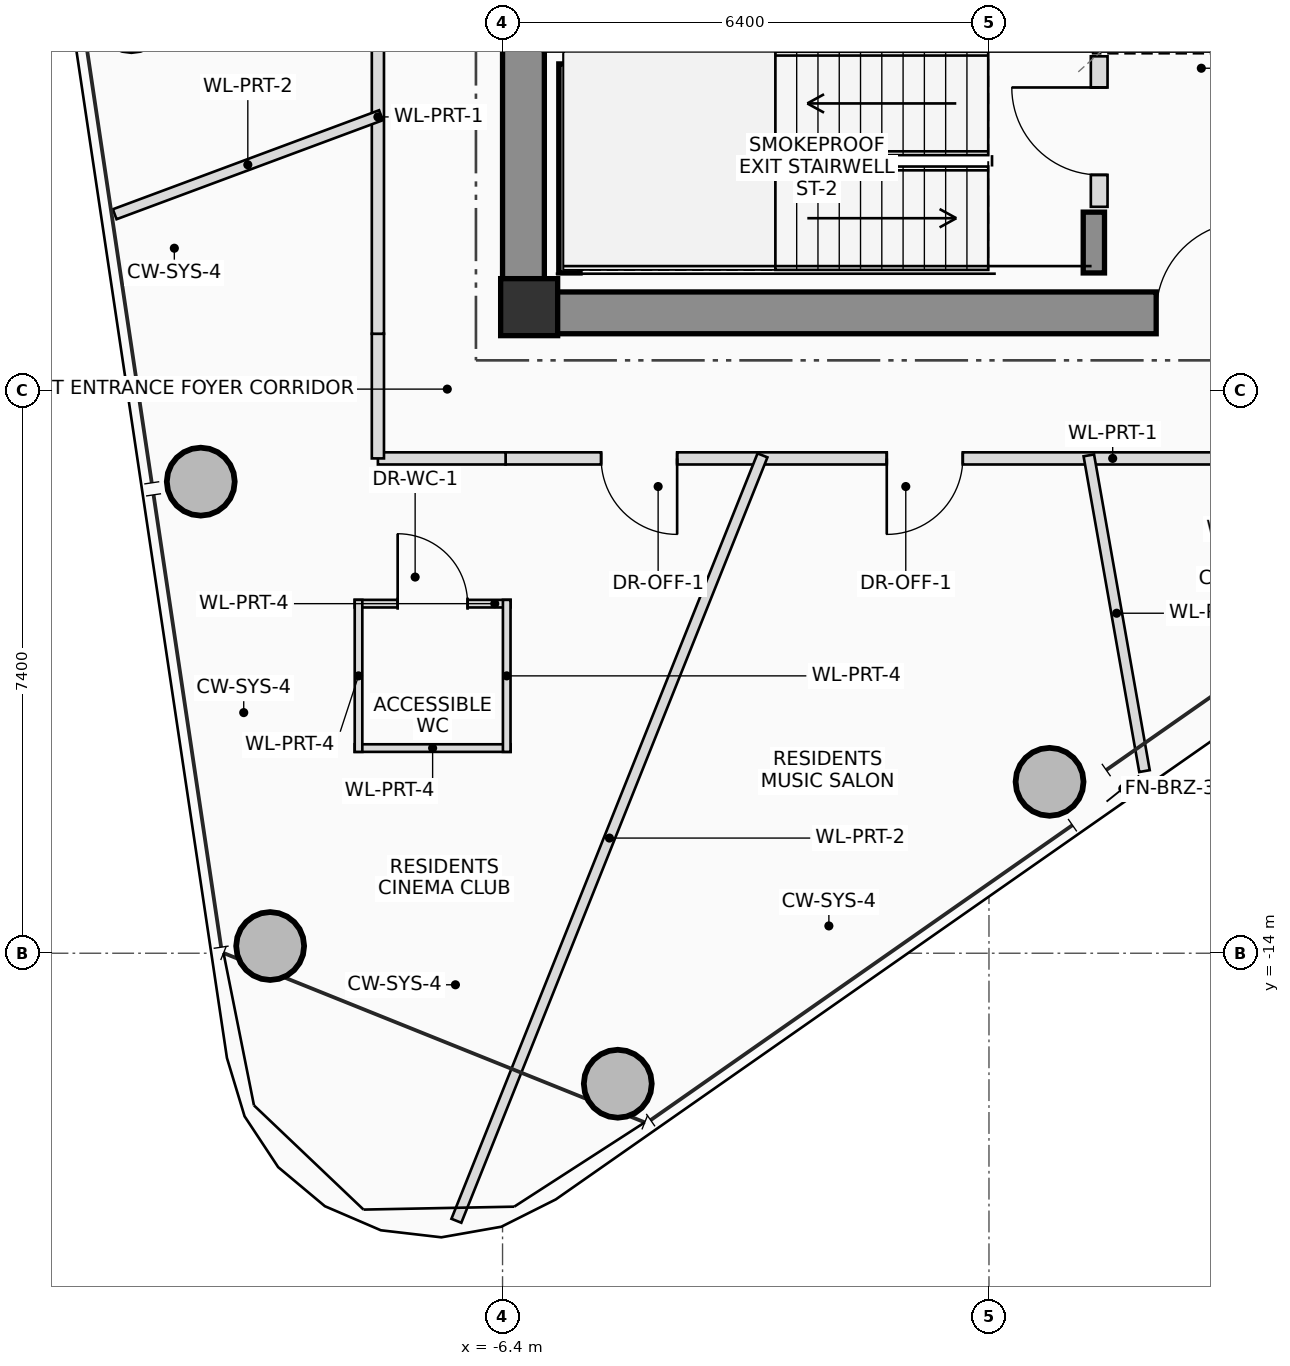
"""IFC4 building model, lengths in metres.
Left out: names, types, materials, properties, quantities, classifications, styles, units other than length and angle.
Written with IfcOpenShell. Run it as: python <this file> out.ifc"""

import sys

from ifc_helpers import new_model, si_unit, direction, frame, frame_2d, origin, origin_2d, place, context, subcontext, project, spatial, rectangle, hollow_circle, extrude, source, transform, mapped, element, fill, save


model = new_model("IFC4")
c1 = context("Model", 3, precision=1e-05, world=origin(), true_north=direction((0.0, 1.0)))
c2 = subcontext(c1, "Body", "Model", "MODEL_VIEW")
j1 = project(units=[si_unit("LENGTHUNIT", "METRE"), si_unit("PLANEANGLEUNIT", "RADIAN")], contexts=[c1])
p1 = place(None, origin())
s1 = spatial("IfcSite", under=j1, at=p1, CompositionType="ELEMENT")
p2 = place(p1, origin())
s2 = spatial("IfcBuilding", under=s1, at=p2, CompositionType="ELEMENT")
p3 = place(p2, frame((0.0, 0.0, 271.15)))
s3 = spatial("IfcBuildingStorey", under=s2, at=p3, CompositionType="ELEMENT", Elevation=271.15)
m1 = source(origin(), c2, "Body", "SweptSolid", [
    extrude(rectangle(XDim=0.75, YDim=0.75, at=origin_2d()), origin(), (0.0, 0.0, 1.0), 3.4),
])
p4 = place(p3, frame((-6.05, -5.5, 0.0), z_axis=(0.0, 0.0, 1.0), x_axis=(1.0, 0.0, 0.0)))
e1 = element("IfcColumn", 1, at=p4, inside=s3, PredefinedType="COLUMN", context=c2, shape_type="MappedRepresentation", body=[
    mapped(m1, transform((0.0, 0.0, 0.0), scale=1.0)),
])
p5 = place(p3, frame((-6.4, -5.575, 0.0), z_axis=(0.0, 0.0, 1.0), x_axis=(1.0, 0.0, 0.0)))
e2 = element("IfcWall", 2, at=p5, inside=s3, PredefinedType="SHEAR", context=c2, shape_type="SweptSolid", body=[
    extrude(rectangle(XDim=12.8, YDim=0.55, at=frame_2d((6.4, 0.0))), origin(), (0.0, 0.0, 1.0), 3.4),
])
p6 = place(p5, frame((8.6, 0.0, 0.0)))
e3 = element("IfcOpeningElement", 3, at=p6, cuts=e2, PredefinedType="OPENING", context=c2, shape_type="SweptSolid", body=[
    extrude(rectangle(XDim=1.2, YDim=2.2, at=frame_2d((0.6, 1.1))), frame((0.0, 0.285, 0.0), z_axis=(0.0, -1.0, 0.0), x_axis=(1.0, 0.0, 0.0)), (0.0, 0.0, 1.0), 0.57),
])
p7 = place(p3, frame((-6.125, -5.3, 0.0), z_axis=(0.0, 0.0, 1.0), x_axis=(0.0, 1.0, 0.0)))
e4 = element("IfcWall", 4, at=p7, inside=s3, PredefinedType="SHEAR", context=c2, shape_type="SweptSolid", body=[
    extrude(rectangle(XDim=3.55, YDim=0.55, at=frame_2d((1.775, 0.0))), origin(), (0.0, 0.0, 1.0), 3.4),
])
p8 = place(p3, frame((-5.52, -5.05, 0.0), z_axis=(0.0, 0.0, 1.0), x_axis=(0.0, 1.0, 0.0)))
e5 = element("IfcWall", 5, at=p8, inside=s3, PredefinedType="SHEAR", context=c2, shape_type="SweptSolid", body=[
    extrude(rectangle(XDim=2.75, YDim=0.28, at=frame_2d((1.375, 0.0))), origin(), (0.0, 0.0, 1.0), 3.4),
])
p9 = place(p3, frame((1.38, -5.05, 0.0), z_axis=(0.0, 0.0, 1.0), x_axis=(0.0, 1.0, 0.0)))
e6 = element("IfcWall", 6, at=p9, inside=s3, PredefinedType="SHEAR", context=c2, shape_type="SweptSolid", body=[
    extrude(rectangle(XDim=0.8, YDim=0.28, at=frame_2d((0.4, 0.0))), origin(), (0.0, 0.0, 1.0), 3.4),
])
m2 = source(origin(), c2, "Body", "SweptSolid", [
    extrude(hollow_circle(Radius=0.45, WallThickness=0.032, at=origin_2d()), origin(), (0.0, 0.0, 1.0), 3.4),
])
for number, where, z_axis, x_axis in (
    (7, (-4.884, -15.717, 0.0), (0.0, 0.0, 1.0), (1.0, 0.0, 0.0)),
    (8, (0.797, -11.745, 0.0), (0.0, 0.0, 1.0), (1.0, 0.0, 0.0)),
    (9, (-10.371, -7.796, 0.0), (0.0, 0.0, 1.0), (1.0, 0.0, 0.0)),
    (10, (-9.458, -13.905, 0.0), (0.0, 0.0, 1.0), (1.0, 0.0, 0.0)),
):
    element("IfcColumn", number, at=place(p3, frame(where, z_axis=z_axis, x_axis=x_axis)), inside=s3, PredefinedType="COLUMN", context=c2, shape_type="MappedRepresentation", body=[
        mapped(m2, transform((0.0, 0.0, 0.0), scale=1.0)),
    ])
p10 = place(p3, frame((1.45, -4.18, 0.0), z_axis=(0.0, 0.0, 1.0), x_axis=(0.0, 1.0, 0.0)))
e11 = element("IfcWall", 11, at=p10, inside=s3, PredefinedType="PLUMBINGWALL", context=c2, shape_type="SweptSolid", body=[
    extrude(rectangle(XDim=1.98, YDim=0.22, at=frame_2d((0.99, 0.0))), origin(), (0.0, 0.0, 1.0), 3.2),
])
p11 = place(p10, frame((0.42, 0.0, 0.0)))
e12 = element("IfcOpeningElement", 12, at=p11, cuts=e11, PredefinedType="OPENING", context=c2, shape_type="SweptSolid", body=[
    extrude(rectangle(XDim=1.15, YDim=2.15, at=frame_2d((0.575, 1.075))), frame((0.0, 0.12, 0.0), z_axis=(0.0, -1.0, 0.0), x_axis=(1.0, 0.0, 0.0)), (0.0, 0.0, 1.0), 0.24),
])
p12 = place(p3, frame((-8.345, -9.401, 0.0), z_axis=(0.0, 0.0, 1.0), x_axis=(1.0, 0.0, 0.0)))
e13 = element("IfcWall", 13, at=p12, inside=s3, PredefinedType="PARTITIONING", context=c2, shape_type="SweptSolid", body=[
    extrude(rectangle(XDim=2.05, YDim=0.1, at=frame_2d((1.025, 0.0))), origin(), (0.0, 0.0, 1.0), 2.605),
])
p13 = place(p12, frame((0.565, 0.0, 0.0)))
e14 = element("IfcOpeningElement", 14, at=p13, cuts=e13, PredefinedType="OPENING", context=c2, shape_type="SweptSolid", body=[
    extrude(rectangle(XDim=0.92, YDim=2.1, at=frame_2d((0.46, 1.05))), frame((0.0, 0.06, 0.0), z_axis=(0.0, -1.0, 0.0), x_axis=(1.0, 0.0, 0.0)), (0.0, 0.0, 1.0), 0.12),
])
p14 = place(p3, frame((-6.295, -11.301, 0.0), z_axis=(0.0, 0.0, 1.0), x_axis=(-1.0, 0.0, 0.0)))
e15 = element("IfcWall", 15, at=p14, inside=s3, PredefinedType="PARTITIONING", context=c2, shape_type="SweptSolid", body=[
    extrude(rectangle(XDim=2.05, YDim=0.1, at=frame_2d((1.025, 0.0))), origin(), (0.0, 0.0, 1.0), 3.2),
])
p15 = place(p3, frame((-6.345, -9.351, 0.0), z_axis=(0.0, 0.0, 1.0), x_axis=(0.0, -1.0, 0.0)))
e16 = element("IfcWall", 16, at=p15, inside=s3, PredefinedType="PARTITIONING", context=c2, shape_type="SweptSolid", body=[
    extrude(rectangle(XDim=2.0, YDim=0.1, at=frame_2d((1.0, 0.0))), origin(), (0.0, 0.0, 1.0), 2.805),
])
p16 = place(p3, frame((-8.295, -11.351, 0.0), z_axis=(0.0, 0.0, 1.0), x_axis=(0.0, 1.0, 0.0)))
e17 = element("IfcWall", 17, at=p16, inside=s3, PredefinedType="PARTITIONING", context=c2, shape_type="SweptSolid", body=[
    extrude(rectangle(XDim=2.0, YDim=0.1, at=frame_2d((1.0, 0.0))), origin(), (0.0, 0.0, 1.0), 2.605),
])
p17 = place(p3, frame((3.45, -7.49, 0.0), z_axis=(0.0, 0.0, 1.0), x_axis=(-1.0, 0.0, 0.0)))
e18 = element("IfcWall", 18, at=p17, inside=s3, PredefinedType="PARTITIONING", context=c2, shape_type="SweptSolid", body=[
    extrude(rectangle(XDim=9.81, YDim=0.16, at=frame_2d((4.905, 0.0))), origin(), (0.0, 0.0, 1.0), 2.605),
])
p18 = place(p17, frame((3.795, 0.0, 0.0)))
e19 = element("IfcOpeningElement", 19, at=p18, cuts=e18, PredefinedType="OPENING", context=c2, shape_type="SweptSolid", body=[
    extrude(rectangle(XDim=1.0, YDim=2.25, at=frame_2d((0.5, 1.125))), frame((0.0, 0.09, 0.0), z_axis=(0.0, -1.0, 0.0), x_axis=(1.0, 0.0, 0.0)), (0.0, 0.0, 1.0), 0.18),
])
p19 = place(p17, frame((7.553, 0.0, 0.0)))
e20 = element("IfcOpeningElement", 20, at=p19, cuts=e18, PredefinedType="OPENING", context=c2, shape_type="SweptSolid", body=[
    extrude(rectangle(XDim=1.0, YDim=2.25, at=frame_2d((0.5, 1.125))), frame((0.0, 0.09, 0.0), z_axis=(0.0, -1.0, 0.0), x_axis=(1.0, 0.0, 0.0)), (0.0, 0.0, 1.0), 0.18),
])
p20 = place(p3, frame((-6.36, -7.49, 0.0), z_axis=(0.0, 0.0, 1.0), x_axis=(-1.0, 0.0, 0.0)))
e21 = element("IfcWall", 21, at=p20, inside=s3, PredefinedType="PARTITIONING", context=c2, shape_type="SweptSolid", body=[
    extrude(rectangle(XDim=1.68, YDim=0.16, at=frame_2d((0.84, 0.0))), origin(), (0.0, 0.0, 1.0), 2.605),
])
p21 = place(p3, frame((-8.04, -7.49, 0.0), z_axis=(0.0, 0.0, 1.0), x_axis=(0.0, 1.0, 0.0)))
e22 = element("IfcWall", 22, at=p21, inside=s3, PredefinedType="PARTITIONING", context=c2, shape_type="SweptSolid", body=[
    extrude(rectangle(XDim=1.64, YDim=0.16, at=frame_2d((0.82, 0.0))), origin(), (0.0, 0.0, 1.0), 2.605),
])
p22 = place(p3, frame((-8.04, -5.85, 0.0), z_axis=(0.0, 0.0, 1.0), x_axis=(0.0, 1.0, 0.0)))
e23 = element("IfcWall", 23, at=p22, inside=s3, PredefinedType="PARTITIONING", context=c2, shape_type="SweptSolid", body=[
    extrude(rectangle(XDim=11.7, YDim=0.16, at=frame_2d((5.85, 0.0))), origin(), (0.0, 0.0, 1.0), 2.605),
])
p23 = place(p22, frame((5.855, 0.0, 0.0)))
e24 = element("IfcOpeningElement", 24, at=p23, cuts=e23, PredefinedType="OPENING", context=c2, shape_type="SweptSolid", body=[
    extrude(rectangle(XDim=1.0, YDim=2.25, at=frame_2d((0.5, 1.125))), frame((0.0, 0.09, 0.0), z_axis=(0.0, -1.0, 0.0), x_axis=(1.0, 0.0, 0.0)), (0.0, 0.0, 1.0), 0.18),
])
p24 = place(p3, frame((-8.0, -2.975, 0.0), z_axis=(0.0, 0.0, 1.0), x_axis=(-0.937281421119, -0.348573575627, 0.0)))
e25 = element("IfcWall", 25, at=p24, inside=s3, PredefinedType="PARTITIONING", context=c2, shape_type="SweptSolid", body=[
    extrude(rectangle(XDim=3.737, YDim=0.14, at=frame_2d((1.869, 0.0))), origin(), (0.0, 0.0, 1.0), 2.605),
])
p25 = place(p3, frame((-2.98, -7.45, 0.0), z_axis=(0.0, 0.0, 1.0), x_axis=(-0.37136350778, -0.928487557854, 0.0)))
e26 = element("IfcWall", 26, at=p25, inside=s3, PredefinedType="PARTITIONING", context=c2, shape_type="SweptSolid", body=[
    extrude(rectangle(XDim=10.845, YDim=0.14, at=frame_2d((5.423, 0.0))), origin(), (0.0, 0.0, 1.0), 2.605),
])
p26 = place(p3, frame((1.314, -7.45, 0.0), z_axis=(0.0, 0.0, 1.0), x_axis=(0.17364664795, -0.984808022741, 0.0)))
e27 = element("IfcWall", 27, at=p26, inside=s3, PredefinedType="PARTITIONING", context=c2, shape_type="SweptSolid", body=[
    extrude(rectangle(XDim=4.218, YDim=0.14, at=frame_2d((2.109, 0.0))), origin(), (0.0, 0.0, 1.0), 2.605),
])
p27 = place(p6, origin())
e28 = element("IfcDoor", 28, at=p27, inside=s3, OperationType="SINGLE_SWING_RIGHT", PredefinedType="DOOR", context=c2, shape_type="SweptSolid", body=[
    extrude(rectangle(XDim=1.2, YDim=2.2, at=frame_2d((0.6, 1.1))), frame((0.0, 0.025, 0.0), z_axis=(0.0, -1.0, 0.0), x_axis=(1.0, 0.0, 0.0)), (0.0, 0.0, 1.0), 0.05),
])
fill(e3, e28)
p28 = place(p11, origin())
e29 = element("IfcDoor", 29, at=p28, inside=s3, OperationType="SINGLE_SWING_RIGHT", PredefinedType="DOOR", context=c2, shape_type="SweptSolid", body=[
    extrude(rectangle(XDim=1.15, YDim=2.15, at=frame_2d((0.575, 1.075))), frame((0.0, 0.025, 0.0), z_axis=(0.0, -1.0, 0.0), x_axis=(1.0, 0.0, 0.0)), (0.0, 0.0, 1.0), 0.05),
])
fill(e12, e29)
p29 = place(p13, origin())
e30 = element("IfcDoor", 30, at=p29, inside=s3, OperationType="SINGLE_SWING_LEFT", PredefinedType="DOOR", context=c2, shape_type="SweptSolid", body=[
    extrude(rectangle(XDim=0.92, YDim=2.1, at=frame_2d((0.46, 1.05))), frame((0.0, 0.025, 0.0), z_axis=(0.0, -1.0, 0.0), x_axis=(1.0, 0.0, 0.0)), (0.0, 0.0, 1.0), 0.05),
])
fill(e14, e30)
p30 = place(p18, origin())
e31 = element("IfcDoor", 31, at=p30, inside=s3, OperationType="SINGLE_SWING_RIGHT", PredefinedType="DOOR", context=c2, shape_type="SweptSolid", body=[
    extrude(rectangle(XDim=1.0, YDim=2.25, at=frame_2d((0.5, 1.125))), frame((0.0, 0.025, 0.0), z_axis=(0.0, -1.0, 0.0), x_axis=(1.0, 0.0, 0.0)), (0.0, 0.0, 1.0), 0.05),
])
fill(e19, e31)
p31 = place(p19, origin())
e32 = element("IfcDoor", 32, at=p31, inside=s3, OperationType="SINGLE_SWING_LEFT", PredefinedType="DOOR", context=c2, shape_type="SweptSolid", body=[
    extrude(rectangle(XDim=1.0, YDim=2.25, at=frame_2d((0.5, 1.125))), frame((0.0, 0.025, 0.0), z_axis=(0.0, -1.0, 0.0), x_axis=(1.0, 0.0, 0.0)), (0.0, 0.0, 1.0), 0.05),
])
fill(e20, e32)
save(model, sys.argv[1])
